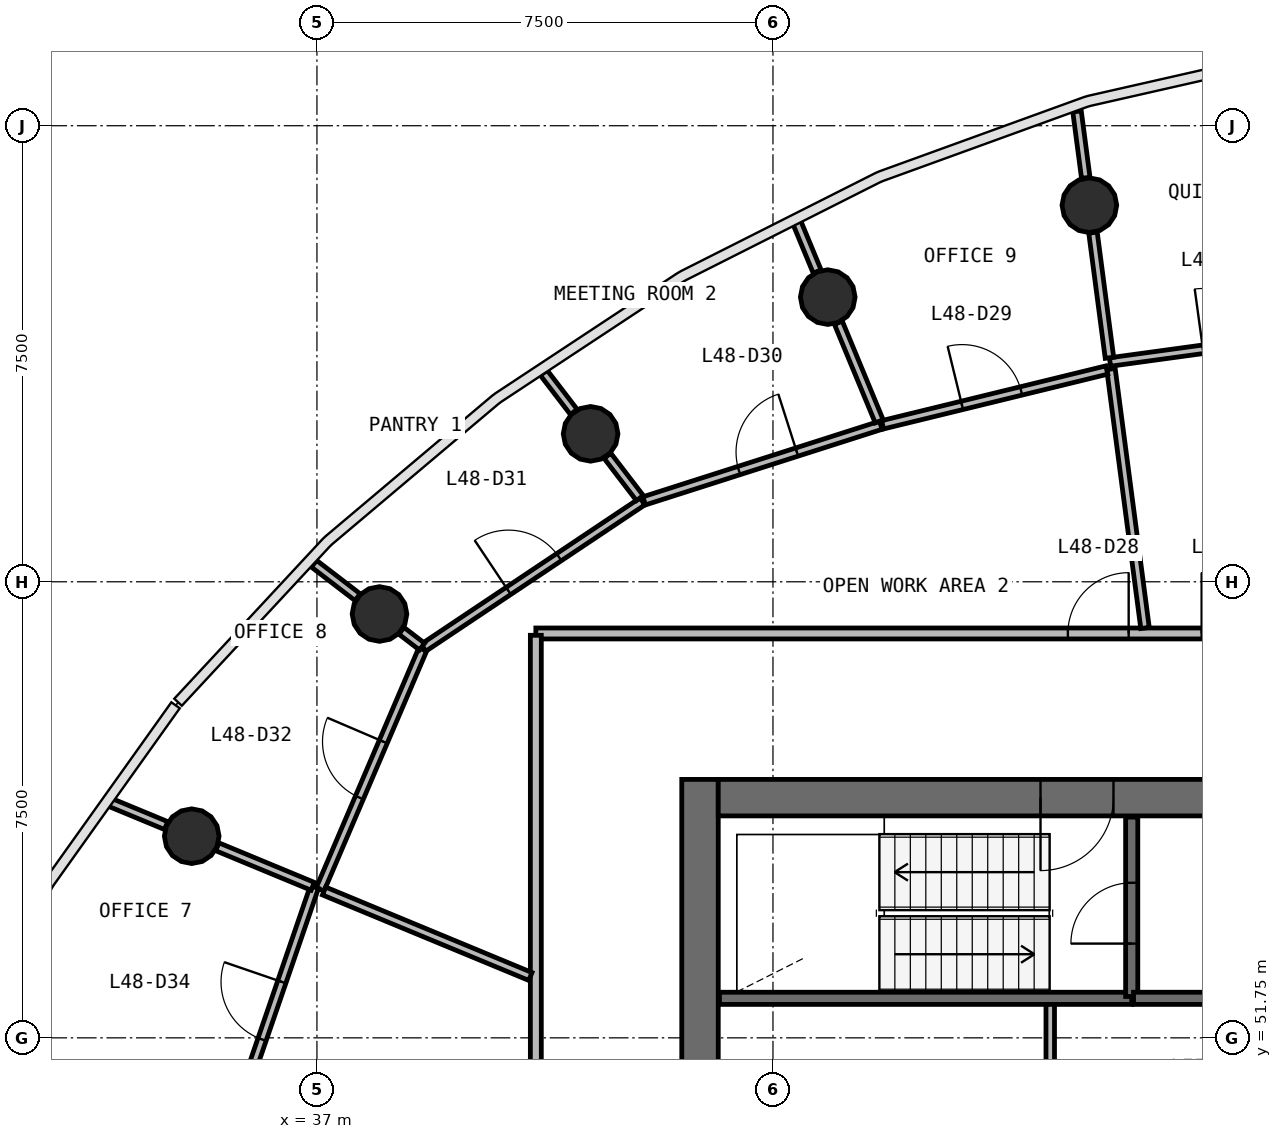
"""IFC4 building model, lengths in metres.
Left out: names, types, materials, properties, quantities, classifications, styles, units other than length and angle.
Written with IfcOpenShell. Run it as: python <this file> out.ifc"""

import sys

from ifc_helpers import new_model, si_unit, direction, frame, frame_2d, origin, origin_2d, place, context, subcontext, project, spatial, rectangle, circle, extrude, source, transform, mapped, element, fill, save


model = new_model("IFC4")
c1 = context("Model", 3, precision=1e-05, world=origin(), true_north=direction((0.0, 1.0)))
c2 = subcontext(c1, "Body", "Model", "MODEL_VIEW")
j1 = project(units=[si_unit("LENGTHUNIT", "METRE"), si_unit("PLANEANGLEUNIT", "RADIAN")], contexts=[c1])
p1 = place(None, origin())
s1 = spatial("IfcSite", under=j1, at=p1, CompositionType="ELEMENT")
p2 = place(p1, origin())
s2 = spatial("IfcBuilding", under=s1, at=p2, CompositionType="ELEMENT")
p3 = place(p2, frame((0.0, 0.0, 199.4)))
s3 = spatial("IfcBuildingStorey", under=s2, at=p3, CompositionType="ELEMENT", Elevation=199.4)
p4 = place(p3, frame((43.3, 56.0, 0.0), z_axis=(0.0, 0.0, 1.0), x_axis=(0.0, -1.0, 0.0)))
e1 = element("IfcWall", 1, at=p4, inside=s3, PredefinedType="SHEAR", context=c2, shape_type="SweptSolid", body=[
    extrude(rectangle(XDim=16.0, YDim=0.6, at=frame_2d((8.0, 0.0))), origin(), (0.0, 0.0, 1.0), 3.9),
])
p5 = place(p4, frame((7.1, 0.0, 0.0)))
e2 = element("IfcOpeningElement", 2, at=p5, cuts=e1, PredefinedType="OPENING", context=c2, shape_type="SweptSolid", body=[
    extrude(rectangle(XDim=1.8, YDim=2.1, at=frame_2d((0.9, 1.05))), frame((0.0, 0.31, 0.0), z_axis=(0.0, -1.0, 0.0), x_axis=(1.0, 0.0, 0.0)), (0.0, 0.0, 1.0), 0.62),
])
p6 = place(p3, frame((60.4, 55.7, 0.0), z_axis=(0.0, 0.0, 1.0), x_axis=(-1.0, 0.0, 0.0)))
e3 = element("IfcWall", 3, at=p6, inside=s3, PredefinedType="SHEAR", context=c2, shape_type="SweptSolid", body=[
    extrude(rectangle(XDim=16.8, YDim=0.6, at=frame_2d((8.4, 0.0))), origin(), (0.0, 0.0, 1.0), 3.9),
])
p7 = place(p6, frame((0.4, 0.0, 0.0)))
e4 = element("IfcOpeningElement", 4, at=p7, cuts=e3, PredefinedType="OPENING", context=c2, shape_type="SweptSolid", body=[
    extrude(rectangle(XDim=1.1, YDim=2.1, at=frame_2d((0.55, 1.05))), frame((0.0, 0.31, 0.0), z_axis=(0.0, -1.0, 0.0), x_axis=(1.0, 0.0, 0.0)), (0.0, 0.0, 1.0), 0.62),
])
p8 = place(p6, frame((10.3, 0.0, 0.0)))
e5 = element("IfcOpeningElement", 5, at=p8, cuts=e3, PredefinedType="OPENING", context=c2, shape_type="SweptSolid", body=[
    extrude(rectangle(XDim=1.2, YDim=2.1, at=frame_2d((0.6, 1.05))), frame((0.0, 0.31, 0.0), z_axis=(0.0, -1.0, 0.0), x_axis=(1.0, 0.0, 0.0)), (0.0, 0.0, 1.0), 0.62),
])
p9 = place(p6, frame((7.25, 0.0, 0.0)))
e6 = element("IfcOpeningElement", 6, at=p9, cuts=e3, PredefinedType="OPENING", context=c2, shape_type="SweptSolid", body=[
    extrude(rectangle(XDim=1.1, YDim=2.1, at=frame_2d((0.55, 1.05))), frame((0.0, 0.31, 0.0), z_axis=(0.0, -1.0, 0.0), x_axis=(1.0, 0.0, 0.0)), (0.0, 0.0, 1.0), 0.62),
])
m1 = source(origin(), c2, "Body", "SweptSolid", [
    extrude(circle(Radius=0.45, at=origin_2d()), origin(), (0.0, 0.0, 1.0), 3.9),
])
for number, where, z_axis, x_axis in (
    (7, (49.704, 65.442, 0.0), (0.0, 0.0, 1.0), (1.0, 0.0, 0.0)),
    (8, (45.401, 63.931, 0.0), (0.0, 0.0, 1.0), (1.0, 0.0, 0.0)),
    (9, (41.501, 61.683, 0.0), (0.0, 0.0, 1.0), (1.0, 0.0, 0.0)),
    (10, (38.029, 58.72, 0.0), (0.0, 0.0, 1.0), (1.0, 0.0, 0.0)),
    (11, (34.941, 55.066, 0.0), (0.0, 0.0, 1.0), (1.0, 0.0, 0.0)),
):
    element("IfcColumn", number, at=place(p3, frame(where, z_axis=z_axis, x_axis=x_axis)), inside=s3, PredefinedType="COLUMN", context=c2, shape_type="MappedRepresentation", body=[
        mapped(m1, transform((0.0, 0.0, 0.0), scale=1.0)),
    ])
p10 = place(p3, frame((43.62, 52.4, 0.0), z_axis=(0.0, 0.0, 1.0), x_axis=(1.0, 0.0, 0.0)))
e12 = element("IfcWall", 12, at=p10, inside=s3, PredefinedType="SOLIDWALL", context=c2, shape_type="SweptSolid", body=[
    extrude(rectangle(XDim=6.78, YDim=0.2, at=frame_2d((3.39, 0.0))), origin(), (0.0, 0.0, 1.0), 3.58),
])
p11 = place(p3, frame((50.4, 52.43, 0.0), z_axis=(0.0, 0.0, 1.0), x_axis=(0.0, 1.0, 0.0)))
e13 = element("IfcWall", 13, at=p11, inside=s3, PredefinedType="SOLIDWALL", context=c2, shape_type="SweptSolid", body=[
    extrude(rectangle(XDim=2.95, YDim=0.2, at=frame_2d((1.475, 0.0))), origin(), (0.0, 0.0, 1.0), 3.58),
])
p12 = place(p11, frame((0.87, 0.0, 0.0)))
e14 = element("IfcOpeningElement", 14, at=p12, cuts=e13, PredefinedType="OPENING", context=c2, shape_type="SweptSolid", body=[
    extrude(rectangle(XDim=1.0, YDim=2.1, at=frame_2d((0.5, 1.05))), frame((0.0, 0.11, 0.0), z_axis=(0.0, -1.0, 0.0), x_axis=(1.0, 0.0, 0.0)), (0.0, 0.0, 1.0), 0.22),
])
p13 = place(p3, frame((50.43, 52.4, 0.0), z_axis=(0.0, 0.0, 1.0), x_axis=(1.0, 0.0, 0.0)))
e15 = element("IfcWall", 15, at=p13, inside=s3, PredefinedType="SOLIDWALL", context=c2, shape_type="SweptSolid", body=[
    extrude(rectangle(XDim=2.24, YDim=0.2, at=frame_2d((1.12, 0.0))), origin(), (0.0, 0.0, 1.0), 3.58),
])
p14 = place(p3, frame((40.6, 58.4, 0.0), z_axis=(0.0, 0.0, 1.0), x_axis=(1.0, 0.0, 0.0)))
e16 = element("IfcWall", 16, at=p14, inside=s3, PredefinedType="PARTITIONING", context=c2, shape_type="SweptSolid", body=[
    extrude(rectangle(XDim=22.8, YDim=0.18, at=frame_2d((11.4, 0.0))), origin(), (0.0, 0.0, 1.0), 2.88),
])
p15 = place(p14, frame((10.95, 0.0, 0.0)))
e17 = element("IfcOpeningElement", 17, at=p15, cuts=e16, PredefinedType="OPENING", context=c2, shape_type="SweptSolid", body=[
    extrude(rectangle(XDim=1.0, YDim=2.1, at=frame_2d((0.5, 1.05))), frame((0.0, 0.1, 0.0), z_axis=(0.0, -1.0, 0.0), x_axis=(1.0, 0.0, 0.0)), (0.0, 0.0, 1.0), 0.2),
])
p16 = place(p14, frame((8.75, 0.0, 0.0)))
e18 = element("IfcOpeningElement", 18, at=p16, cuts=e16, PredefinedType="OPENING", context=c2, shape_type="SweptSolid", body=[
    extrude(rectangle(XDim=1.0, YDim=2.1, at=frame_2d((0.5, 1.05))), frame((0.0, 0.1, 0.0), z_axis=(0.0, -1.0, 0.0), x_axis=(1.0, 0.0, 0.0)), (0.0, 0.0, 1.0), 0.2),
])
p17 = place(p3, frame((40.6, 37.63, 0.0), z_axis=(0.0, 0.0, 1.0), x_axis=(0.0, 1.0, 0.0)))
e19 = element("IfcWall", 19, at=p17, inside=s3, PredefinedType="PARTITIONING", context=c2, shape_type="SweptSolid", body=[
    extrude(rectangle(XDim=20.74, YDim=0.18, at=frame_2d((10.37, 0.0))), origin(), (0.0, 0.0, 1.0), 2.88),
])
p18 = place(p17, frame((9.89, 0.0, 0.0)))
e20 = element("IfcOpeningElement", 20, at=p18, cuts=e19, PredefinedType="OPENING", context=c2, shape_type="SweptSolid", body=[
    extrude(rectangle(XDim=1.0, YDim=2.1, at=frame_2d((0.5, 1.05))), frame((0.0, 0.1, 0.0), z_axis=(0.0, -1.0, 0.0), x_axis=(1.0, 0.0, 0.0)), (0.0, 0.0, 1.0), 0.2),
])
p19 = place(p17, frame((4.29, 0.0, 0.0)))
e21 = element("IfcOpeningElement", 21, at=p19, cuts=e19, PredefinedType="OPENING", context=c2, shape_type="SweptSolid", body=[
    extrude(rectangle(XDim=1.0, YDim=2.1, at=frame_2d((0.5, 1.05))), frame((0.0, 0.1, 0.0), z_axis=(0.0, -1.0, 0.0), x_axis=(1.0, 0.0, 0.0)), (0.0, 0.0, 1.0), 0.2),
])
p20 = place(p3, frame((50.619, 58.49, 0.0), z_axis=(0.0, 0.0, 1.0), x_axis=(-0.13048832594, 0.991449845829, 0.0)))
e22 = element("IfcWall", 22, at=p20, inside=s3, PredefinedType="PARTITIONING", context=c2, shape_type="SweptSolid", body=[
    extrude(rectangle(XDim=4.296, YDim=0.14, at=frame_2d((2.148, 0.0))), origin(), (0.0, 0.0, 1.0), 2.88),
])
p21 = place(p3, frame((38.752, 58.166, 0.0), z_axis=(0.0, 0.0, 1.0), x_axis=(0.831520936595, 0.555493413106, 0.0)))
e23 = element("IfcWall", 23, at=p21, inside=s3, PredefinedType="PARTITIONING", context=c2, shape_type="SweptSolid", body=[
    extrude(rectangle(XDim=4.331, YDim=0.14, at=frame_2d((2.166, 0.0))), origin(), (0.0, 0.0, 1.0), 2.88),
])
p22 = place(p21, frame((1.681, 0.0, 0.0)))
e24 = element("IfcOpeningElement", 24, at=p22, cuts=e23, PredefinedType="OPENING", context=c2, shape_type="SweptSolid", body=[
    extrude(rectangle(XDim=1.0, YDim=2.1, at=frame_2d((0.5, 1.05))), frame((0.0, 0.08, 0.0), z_axis=(0.0, -1.0, 0.0), x_axis=(1.0, 0.0, 0.0)), (0.0, 0.0, 1.0), 0.16),
])
p23 = place(p3, frame((37.052, 54.191, 0.0), z_axis=(0.0, 0.0, 1.0), x_axis=(0.393136601212, 0.919480077428, 0.0)))
e25 = element("IfcWall", 25, at=p23, inside=s3, PredefinedType="PARTITIONING", context=c2, shape_type="SweptSolid", body=[
    extrude(rectangle(XDim=4.292, YDim=0.14, at=frame_2d((2.146, 0.0))), origin(), (0.0, 0.0, 1.0), 2.88),
])
p24 = place(p23, frame((1.642, 0.0, 0.0)))
e26 = element("IfcOpeningElement", 26, at=p24, cuts=e25, PredefinedType="OPENING", context=c2, shape_type="SweptSolid", body=[
    extrude(rectangle(XDim=1.0, YDim=2.1, at=frame_2d((0.5, 1.05))), frame((0.0, 0.08, 0.0), z_axis=(0.0, -1.0, 0.0), x_axis=(1.0, 0.0, 0.0)), (0.0, 0.0, 1.0), 0.16),
])
p25 = place(p3, frame((35.571, 50.192, 0.0), z_axis=(0.0, 0.0, 1.0), x_axis=(0.324894390552, 0.945750302663, 0.0)))
e27 = element("IfcWall", 27, at=p25, inside=s3, PredefinedType="PARTITIONING", context=c2, shape_type="SweptSolid", body=[
    extrude(rectangle(XDim=4.27, YDim=0.14, at=frame_2d((2.135, 0.0))), origin(), (0.0, 0.0, 1.0), 2.88),
])
p26 = place(p25, frame((1.619, 0.0, 0.0)))
e28 = element("IfcOpeningElement", 28, at=p26, cuts=e27, PredefinedType="OPENING", context=c2, shape_type="SweptSolid", body=[
    extrude(rectangle(XDim=1.0, YDim=2.1, at=frame_2d((0.5, 1.05))), frame((0.0, 0.08, 0.0), z_axis=(0.0, -1.0, 0.0), x_axis=(1.0, 0.0, 0.0)), (0.0, 0.0, 1.0), 0.16),
])
p27 = place(p3, frame((42.382, 60.581, 0.0), z_axis=(0.0, 0.0, 1.0), x_axis=(0.952547567563, 0.304389769096, 0.0)))
e29 = element("IfcWall", 29, at=p27, inside=s3, PredefinedType="PARTITIONING", context=c2, shape_type="SweptSolid", body=[
    extrude(rectangle(XDim=4.086, YDim=0.14, at=frame_2d((2.043, 0.0))), origin(), (0.0, 0.0, 1.0), 2.88),
])
p28 = place(p27, frame((1.636, 0.0, 0.0)))
e30 = element("IfcOpeningElement", 30, at=p28, cuts=e29, PredefinedType="OPENING", context=c2, shape_type="SweptSolid", body=[
    extrude(rectangle(XDim=1.0, YDim=2.1, at=frame_2d((0.5, 1.05))), frame((0.0, 0.08, 0.0), z_axis=(0.0, -1.0, 0.0), x_axis=(1.0, 0.0, 0.0)), (0.0, 0.0, 1.0), 0.16),
])
p29 = place(p3, frame((50.043, 62.864, 0.0), z_axis=(0.0, 0.0, 1.0), x_axis=(0.990760455896, 0.135623445731, 0.0)))
e31 = element("IfcWall", 31, at=p29, inside=s3, PredefinedType="PARTITIONING", context=c2, shape_type="SweptSolid", body=[
    extrude(rectangle(XDim=3.993, YDim=0.14, at=frame_2d((1.996, 0.0))), origin(), (0.0, 0.0, 1.0), 2.88),
])
p30 = place(p29, frame((1.543, 0.0, 0.0)))
e32 = element("IfcOpeningElement", 32, at=p30, cuts=e31, PredefinedType="OPENING", context=c2, shape_type="SweptSolid", body=[
    extrude(rectangle(XDim=1.0, YDim=2.1, at=frame_2d((0.5, 1.05))), frame((0.0, 0.08, 0.0), z_axis=(0.0, -1.0, 0.0), x_axis=(1.0, 0.0, 0.0)), (0.0, 0.0, 1.0), 0.16),
])
p31 = place(p3, frame((46.303, 61.832, 0.0), z_axis=(0.0, 0.0, 1.0), x_axis=(0.971437570749, 0.23729527205, 0.0)))
e33 = element("IfcWall", 33, at=p31, inside=s3, PredefinedType="PARTITIONING", context=c2, shape_type="SweptSolid", body=[
    extrude(rectangle(XDim=3.795, YDim=0.14, at=frame_2d((1.898, 0.0))), origin(), (0.0, 0.0, 1.0), 2.88),
])
p32 = place(p31, frame((1.345, 0.0, 0.0)))
e34 = element("IfcOpeningElement", 34, at=p32, cuts=e33, PredefinedType="OPENING", context=c2, shape_type="SweptSolid", body=[
    extrude(rectangle(XDim=1.0, YDim=2.1, at=frame_2d((0.5, 1.05))), frame((0.0, 0.08, 0.0), z_axis=(0.0, -1.0, 0.0), x_axis=(1.0, 0.0, 0.0)), (0.0, 0.0, 1.0), 0.16),
])
p33 = place(p3, frame((40.51, 52.759, 0.0), z_axis=(0.0, 0.0, 1.0), x_axis=(-0.923863687113, 0.3827216843, 0.0)))
e35 = element("IfcWall", 35, at=p33, inside=s3, PredefinedType="PARTITIONING", context=c2, shape_type="SweptSolid", body=[
    extrude(rectangle(XDim=3.672, YDim=0.14, at=frame_2d((1.836, 0.0))), origin(), (0.0, 0.0, 1.0), 2.88),
])
p34 = place(p3, frame((49.06, 50.01, 0.0), z_axis=(0.0, 0.0, 1.0), x_axis=(0.0, 1.0, 0.0)))
e36 = element("IfcWall", 36, at=p34, inside=s3, PredefinedType="PARTITIONING", context=c2, shape_type="SweptSolid", body=[
    extrude(rectangle(XDim=2.29, YDim=0.14, at=frame_2d((1.145, 0.0))), origin(), (0.0, 0.0, 1.0), 2.88),
])
p35 = place(p3, frame((50.034, 62.934, 0.0), z_axis=(0.0, 0.0, 1.0), x_axis=(-0.130530560755, 0.991444286236, 0.0)))
e37 = element("IfcWall", 37, at=p35, inside=s3, PredefinedType="PARTITIONING", context=c2, shape_type="SweptSolid", body=[
    extrude(rectangle(XDim=2.076, YDim=0.14, at=frame_2d((1.038, 0.0))), origin(), (0.0, 0.0, 1.0), 2.88),
])
p36 = place(p3, frame((46.247, 61.889, 0.0), z_axis=(0.0, 0.0, 1.0), x_axis=(-0.382658917189, 0.923889686649, 0.0)))
e38 = element("IfcWall", 38, at=p36, inside=s3, PredefinedType="PARTITIONING", context=c2, shape_type="SweptSolid", body=[
    extrude(rectangle(XDim=1.755, YDim=0.14, at=frame_2d((0.877, 0.0))), origin(), (0.0, 0.0, 1.0), 2.88),
])
p37 = place(p3, frame((36.931, 54.242, 0.0), z_axis=(0.0, 0.0, 1.0), x_axis=(-0.923878465172, 0.382686009139, 0.0)))
e39 = element("IfcWall", 39, at=p37, inside=s3, PredefinedType="PARTITIONING", context=c2, shape_type="SweptSolid", body=[
    extrude(rectangle(XDim=1.699, YDim=0.14, at=frame_2d((0.85, 0.0))), origin(), (0.0, 0.0, 1.0), 2.88),
])
p38 = place(p3, frame((49.644, 65.893, 0.0), z_axis=(0.0, 0.0, 1.0), x_axis=(-0.130551983722, 0.991441465517, 0.0)))
e40 = element("IfcWall", 40, at=p38, inside=s3, PredefinedType="PARTITIONING", context=c2, shape_type="SweptSolid", body=[
    extrude(rectangle(XDim=1.102, YDim=0.14, at=frame_2d((0.551, 0.0))), origin(), (0.0, 0.0, 1.0), 2.88),
])
p39 = place(p3, frame((34.52, 55.24, 0.0), z_axis=(0.0, 0.0, 1.0), x_axis=(-0.923927521376, 0.382567556445, 0.0)))
e41 = element("IfcWall", 41, at=p39, inside=s3, PredefinedType="PARTITIONING", context=c2, shape_type="SweptSolid", body=[
    extrude(rectangle(XDim=0.999, YDim=0.14, at=frame_2d((0.5, 0.0))), origin(), (0.0, 0.0, 1.0), 2.88),
])
p40 = place(p3, frame((42.311, 60.627, 0.0), z_axis=(0.0, 0.0, 1.0), x_axis=(-0.608659697441, 0.793431391307, 0.0)))
e42 = element("IfcWall", 42, at=p40, inside=s3, PredefinedType="PARTITIONING", context=c2, shape_type="SweptSolid", body=[
    extrude(rectangle(XDim=0.876, YDim=0.14, at=frame_2d((0.438, 0.0))), origin(), (0.0, 0.0, 1.0), 2.88),
])
p41 = place(p3, frame((37.668, 58.997, 0.0), z_axis=(0.0, 0.0, 1.0), x_axis=(-0.79343675283, 0.608652708249, 0.0)))
e43 = element("IfcWall", 43, at=p41, inside=s3, PredefinedType="PARTITIONING", context=c2, shape_type="SweptSolid", body=[
    extrude(rectangle(XDim=0.904, YDim=0.14, at=frame_2d((0.452, 0.0))), origin(), (0.0, 0.0, 1.0), 2.88),
])
p42 = place(p3, frame((45.227, 64.352, 0.0), z_axis=(0.0, 0.0, 1.0), x_axis=(-0.382672260774, 0.923884159857, 0.0)))
e44 = element("IfcWall", 44, at=p42, inside=s3, PredefinedType="PARTITIONING", context=c2, shape_type="SweptSolid", body=[
    extrude(rectangle(XDim=0.875, YDim=0.14, at=frame_2d((0.438, 0.0))), origin(), (0.0, 0.0, 1.0), 2.88),
])
p43 = place(p3, frame((41.224, 62.044, 0.0), z_axis=(0.0, 0.0, 1.0), x_axis=(-0.60901253632, 0.793160595721, 0.0)))
e45 = element("IfcWall", 45, at=p43, inside=s3, PredefinedType="PARTITIONING", context=c2, shape_type="SweptSolid", body=[
    extrude(rectangle(XDim=0.811, YDim=0.14, at=frame_2d((0.406, 0.0))), origin(), (0.0, 0.0, 1.0), 2.88),
])
p44 = place(p3, frame((38.728, 58.184, 0.0), z_axis=(0.0, 0.0, 1.0), x_axis=(-0.793495772857, 0.608575762299, 0.0)))
e46 = element("IfcWall", 46, at=p44, inside=s3, PredefinedType="PARTITIONING", context=c2, shape_type="SweptSolid", body=[
    extrude(rectangle(XDim=0.427, YDim=0.14, at=frame_2d((0.213, 0.0))), origin(), (0.0, 0.0, 1.0), 2.88),
])
m2 = source(origin(), c2, "Body", "SweptSolid", [
    extrude(rectangle(XDim=1.2, YDim=2.1, at=frame_2d((0.6, 1.05))), frame((0.0, 0.025, 0.0), z_axis=(0.0, -1.0, 0.0), x_axis=(1.0, 0.0, 0.0)), (0.0, 0.0, 1.0), 0.05),
])
p45 = place(p8, origin())
e47 = element("IfcDoor", 47, at=p45, inside=s3, OperationType="SINGLE_SWING_RIGHT", PredefinedType="DOOR", context=c2, shape_type="MappedRepresentation", body=[
    mapped(m2, transform((0.0, 0.0, 0.0), scale=1.0)),
])
fill(e5, e47)
m3 = source(origin(), c2, "Body", "SweptSolid", [
    extrude(rectangle(XDim=1.0, YDim=2.1, at=frame_2d((0.5, 1.05))), frame((0.0, 0.025, 0.0), z_axis=(0.0, -1.0, 0.0), x_axis=(1.0, 0.0, 0.0)), (0.0, 0.0, 1.0), 0.05),
])
p46 = place(p12, origin())
e48 = element("IfcDoor", 48, at=p46, inside=s3, OperationType="SINGLE_SWING_LEFT", PredefinedType="DOOR", context=c2, shape_type="MappedRepresentation", body=[
    mapped(m3, transform((0.0, 0.0, 0.0), scale=1.0)),
])
fill(e14, e48)
m4 = source(origin(), c2, "Body", "SweptSolid", [
    extrude(rectangle(XDim=1.0, YDim=2.1, at=frame_2d((0.5, 1.05))), frame((0.0, 0.025, 0.0), z_axis=(0.0, -1.0, 0.0), x_axis=(1.0, 0.0, 0.0)), (0.0, 0.0, 1.0), 0.05),
])
p47 = place(p16, origin())
e49 = element("IfcDoor", 49, at=p47, inside=s3, OperationType="SINGLE_SWING_RIGHT", PredefinedType="DOOR", context=c2, shape_type="MappedRepresentation", body=[
    mapped(m4, transform((0.0, 0.0, 0.0), scale=1.0)),
])
fill(e18, e49)
p48 = place(p32, origin())
e50 = element("IfcDoor", 50, at=p48, inside=s3, OperationType="SINGLE_SWING_LEFT", PredefinedType="DOOR", context=c2, shape_type="MappedRepresentation", body=[
    mapped(m4, transform((0.0, 0.0, 0.0), scale=1.0)),
])
fill(e34, e50)
p49 = place(p28, origin())
e51 = element("IfcDoor", 51, at=p49, inside=s3, OperationType="SINGLE_SWING_RIGHT", PredefinedType="DOOR", context=c2, shape_type="MappedRepresentation", body=[
    mapped(m4, transform((0.0, 0.0, 0.0), scale=1.0)),
])
fill(e30, e51)
p50 = place(p22, origin())
e52 = element("IfcDoor", 52, at=p50, inside=s3, OperationType="SINGLE_SWING_LEFT", PredefinedType="DOOR", context=c2, shape_type="MappedRepresentation", body=[
    mapped(m4, transform((0.0, 0.0, 0.0), scale=1.0)),
])
fill(e24, e52)
p51 = place(p24, origin())
e53 = element("IfcDoor", 53, at=p51, inside=s3, OperationType="SINGLE_SWING_RIGHT", PredefinedType="DOOR", context=c2, shape_type="MappedRepresentation", body=[
    mapped(m4, transform((0.0, 0.0, 0.0), scale=1.0)),
])
fill(e26, e53)
p52 = place(p26, origin())
e54 = element("IfcDoor", 54, at=p52, inside=s3, OperationType="SINGLE_SWING_RIGHT", PredefinedType="DOOR", context=c2, shape_type="MappedRepresentation", body=[
    mapped(m4, transform((0.0, 0.0, 0.0), scale=1.0)),
])
fill(e28, e54)
save(model, sys.argv[1])
